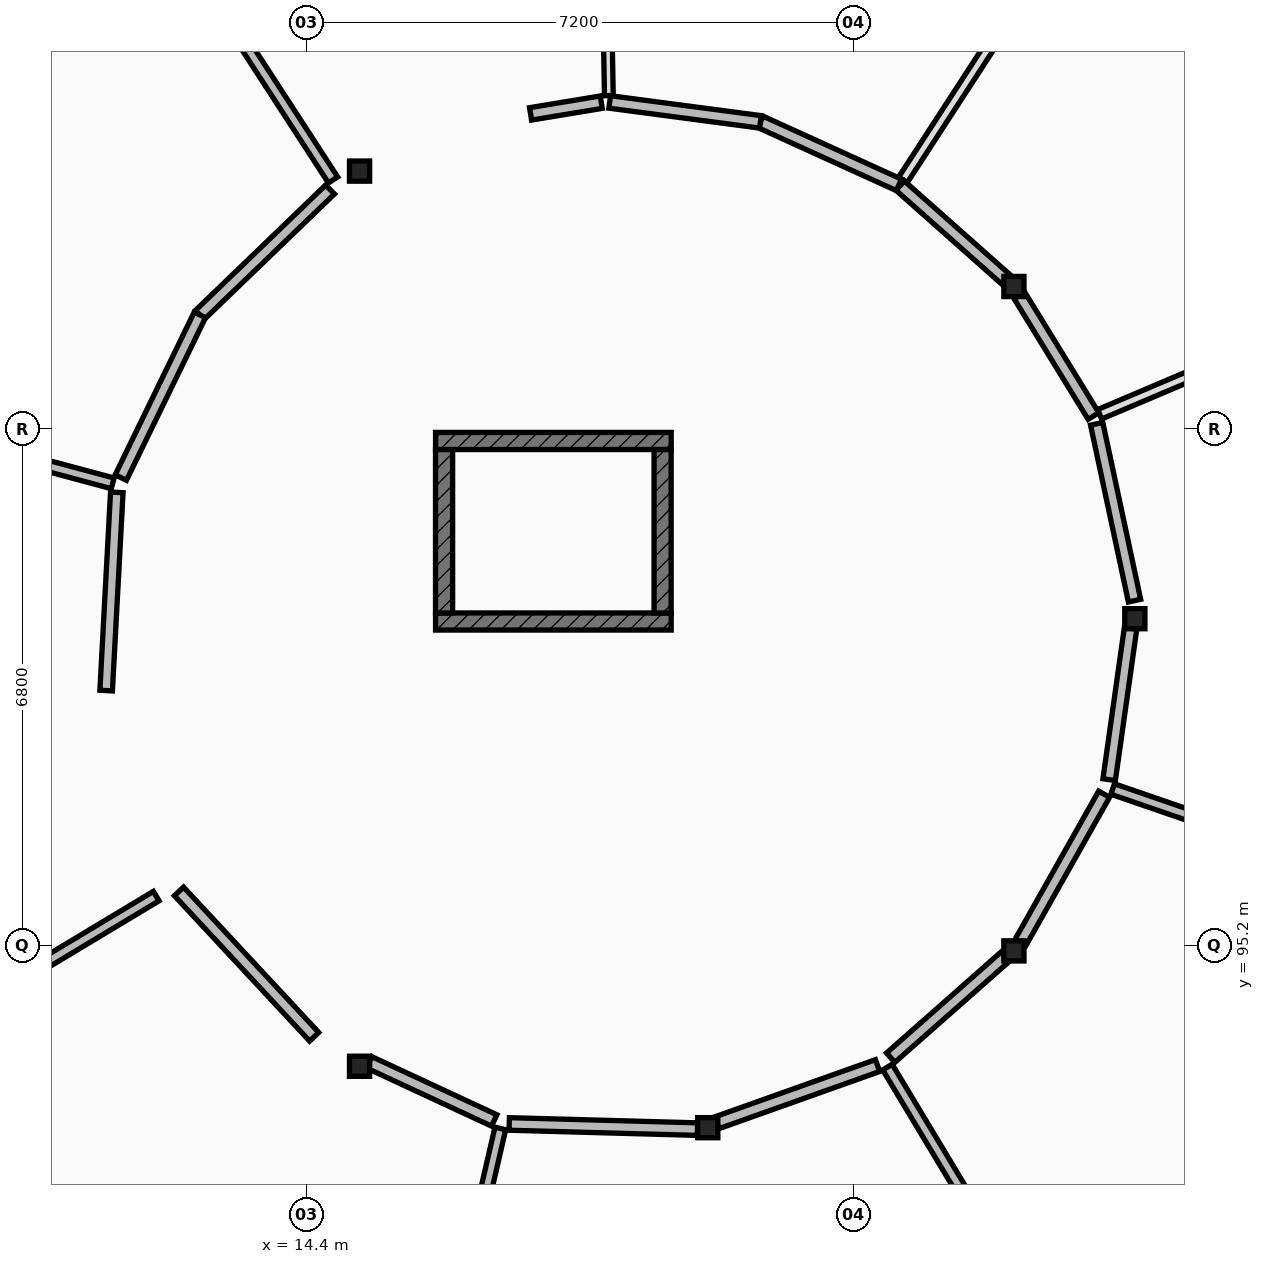
"""IFC4 building model, lengths in metres.
Left out: names, types, materials, properties, quantities, classifications, styles, units other than length and angle.
Written with IfcOpenShell. Run it as: python <this file> out.ifc"""

import sys

from ifc_helpers import new_model, si_unit, direction, frame, frame_2d, origin, origin_2d, place, context, subcontext, project, spatial, rectangle, extrude, element, fill, save


model = new_model("IFC4")
c1 = context("Model", 3, precision=1e-05, world=origin(), true_north=direction((0.0, 1.0)))
c2 = subcontext(c1, "Body", "Model", "MODEL_VIEW")
j1 = project(units=[si_unit("LENGTHUNIT", "METRE"), si_unit("PLANEANGLEUNIT", "RADIAN")], contexts=[c1])
p1 = place(None, origin())
s1 = spatial("IfcSite", under=j1, at=p1, CompositionType="ELEMENT")
p2 = place(p1, origin())
s2 = spatial("IfcBuilding", under=s1, at=p2, CompositionType="ELEMENT")
p3 = place(p2, frame((0.0, 0.0, 17.15)))
s3 = spatial("IfcBuildingStorey", under=s2, at=p3, CompositionType="ELEMENT", Elevation=17.15)
for number, where, z_axis, x_axis in (
    (1, (25.3, 99.5, 0.0), (0.0, 0.0, 1.0), (1.0, 0.0, 0.0)),
    (2, (23.709, 103.871, 0.0), (0.0, 0.0, 1.0), (1.0, 0.0, 0.0)),
    (3, (15.1, 105.389, 0.0), (0.0, 0.0, 1.0), (1.0, 0.0, 0.0)),
    (4, (15.1, 93.611, 0.0), (0.0, 0.0, 1.0), (1.0, 0.0, 0.0)),
    (5, (19.681, 92.803, 0.0), (0.0, 0.0, 1.0), (1.0, 0.0, 0.0)),
    (6, (23.709, 95.129, 0.0), (0.0, 0.0, 1.0), (1.0, 0.0, 0.0)),
):
    element("IfcColumn", number, at=place(p3, frame(where, z_axis=z_axis, x_axis=x_axis)), inside=s3, PredefinedType="COLUMN", context=c2, shape_type="SweptSolid", body=[
        extrude(rectangle(XDim=0.265, YDim=0.265, at=origin_2d()), origin(), (0.0, 0.0, 1.0), 4.2),
    ])
p4 = place(p3, frame((16.1, 99.463, 0.0), z_axis=(0.0, 0.0, 1.0), x_axis=(1.0, 0.0, 0.0)))
e7 = element("IfcWall", 7, at=p4, inside=s3, PredefinedType="SHEAR", context=c2, shape_type="SweptSolid", body=[
    extrude(rectangle(XDim=3.1, YDim=0.225, at=frame_2d((1.55, 0.0))), origin(), (0.0, 0.0, 1.0), 4.015),
])
p5 = place(p4, frame((0.95, 0.0, 0.0)))
e8 = element("IfcOpeningElement", 8, at=p5, cuts=e7, PredefinedType="OPENING", context=c2, shape_type="SweptSolid", body=[
    extrude(rectangle(XDim=1.2, YDim=2.2, at=frame_2d((0.6, 1.1))), frame((0.0, 0.123, 0.0), z_axis=(0.0, -1.0, 0.0), x_axis=(1.0, 0.0, 0.0)), (0.0, 0.0, 1.0), 0.245),
])
p6 = place(p3, frame((16.1, 101.838, 0.0), z_axis=(0.0, 0.0, 1.0), x_axis=(1.0, 0.0, 0.0)))
e9 = element("IfcWall", 9, at=p6, inside=s3, PredefinedType="SHEAR", context=c2, shape_type="SweptSolid", body=[
    extrude(rectangle(XDim=3.1, YDim=0.225, at=frame_2d((1.55, 0.0))), origin(), (0.0, 0.0, 1.0), 4.015),
])
for number, where, z_axis, x_axis in (
    (10, (16.212, 99.575, 0.0), (0.0, 0.0, 1.0), (0.0, 1.0, 0.0)),
    (11, (19.087, 99.575, 0.0), (0.0, 0.0, 1.0), (0.0, 1.0, 0.0)),
):
    element("IfcWall", number, at=place(p3, frame(where, z_axis=z_axis, x_axis=x_axis)), inside=s3, PredefinedType="SHEAR", context=c2, shape_type="SweptSolid", body=[
        extrude(rectangle(XDim=2.15, YDim=0.225, at=frame_2d((1.075, 0.0))), origin(), (0.0, 0.0, 1.0), 4.015),
    ])
p7 = place(p3, frame((14.751, 105.273, 0.0), z_axis=(0.0, 0.0, 1.0), x_axis=(-0.544677189284, 0.838645789039, 0.0)))
e12 = element("IfcWall", 12, at=p7, inside=s3, PredefinedType="PARTITIONING", context=c2, shape_type="SweptSolid", body=[
    extrude(rectangle(XDim=5.875, YDim=0.145, at=frame_2d((2.938, 0.0))), origin(), (0.0, 0.0, 1.0), 3.344),
])
p8 = place(p3, frame((11.852, 101.281, 0.0), z_axis=(0.0, 0.0, 1.0), x_axis=(-0.965846685591, 0.259114221787, 0.0)))
e13 = element("IfcWall", 13, at=p8, inside=s3, PredefinedType="PARTITIONING", context=c2, shape_type="SweptSolid", body=[
    extrude(rectangle(XDim=1.162, YDim=0.145, at=frame_2d((0.581, 0.0))), origin(), (0.0, 0.0, 1.0), 3.344),
])
p9 = place(p3, frame((12.425, 95.85, 0.0), z_axis=(0.0, 0.0, 1.0), x_axis=(-0.857148493381, -0.515069374255, 0.0)))
e14 = element("IfcWall", 14, at=p9, inside=s3, PredefinedType="PARTITIONING", context=c2, shape_type="SweptSolid", body=[
    extrude(rectangle(XDim=5.695, YDim=0.145, at=frame_2d((2.847, 0.0))), origin(), (0.0, 0.0, 1.0), 3.344),
])
p10 = place(p3, frame((16.952, 92.793, 0.0), z_axis=(0.0, 0.0, 1.0), x_axis=(-0.225041614944, -0.97434915279, 0.0)))
e15 = element("IfcWall", 15, at=p10, inside=s3, PredefinedType="PARTITIONING", context=c2, shape_type="SweptSolid", body=[
    extrude(rectangle(XDim=5.875, YDim=0.145, at=frame_2d((2.937, 0.0))), origin(), (0.0, 0.0, 1.0), 3.344),
])
p11 = place(p3, frame((22.045, 93.6, 0.0), z_axis=(0.0, 0.0, 1.0), x_axis=(0.515043444679, -0.857164074197, 0.0)))
e16 = element("IfcWall", 16, at=p11, inside=s3, PredefinedType="PARTITIONING", context=c2, shape_type="SweptSolid", body=[
    extrude(rectangle(XDim=5.899, YDim=0.145, at=frame_2d((2.949, 0.0))), origin(), (0.0, 0.0, 1.0), 3.344),
])
p12 = place(p3, frame((25.008, 97.259, 0.0), z_axis=(0.0, 0.0, 1.0), x_axis=(0.945537377012, -0.325513546068, 0.0)))
e17 = element("IfcWall", 17, at=p12, inside=s3, PredefinedType="PARTITIONING", context=c2, shape_type="SweptSolid", body=[
    extrude(rectangle(XDim=5.898, YDim=0.145, at=frame_2d((2.949, 0.0))), origin(), (0.0, 0.0, 1.0), 3.344),
])
p13 = place(p3, frame((24.836, 102.189, 0.0), z_axis=(0.0, 0.0, 1.0), x_axis=(0.920468107404, 0.390817685438, 0.0)))
e18 = element("IfcWall", 18, at=p13, inside=s3, PredefinedType="PLUMBINGWALL", context=c2, shape_type="SweptSolid", body=[
    extrude(rectangle(XDim=5.875, YDim=0.135, at=frame_2d((2.938, 0.0))), origin(), (0.0, 0.0, 1.0), 3.344),
])
p14 = place(p3, frame((22.249, 105.273, 0.0), z_axis=(0.0, 0.0, 1.0), x_axis=(0.544677189284, 0.838645789039, 0.0)))
e19 = element("IfcWall", 19, at=p14, inside=s3, PredefinedType="PLUMBINGWALL", context=c2, shape_type="SweptSolid", body=[
    extrude(rectangle(XDim=5.875, YDim=0.135, at=frame_2d((2.938, 0.0))), origin(), (0.0, 0.0, 1.0), 3.344),
])
p15 = place(p3, frame((18.38, 106.382, 0.0), z_axis=(0.0, 0.0, 1.0), x_axis=(-0.017869018934, 0.999840336335, 0.0)))
e20 = element("IfcWall", 20, at=p15, inside=s3, PredefinedType="PARTITIONING", context=c2, shape_type="SweptSolid", body=[
    extrude(rectangle(XDim=0.888, YDim=0.115, at=frame_2d((0.444, 0.0))), origin(), (0.0, 0.0, 1.0), 3.344),
])
p16 = place(p3, frame((14.712, 105.147, 0.0), z_axis=(0.0, 0.0, 1.0), x_axis=(-0.720225223762, -0.693740316731, 0.0)))
e21 = element("IfcWall", 21, at=p16, inside=s3, PredefinedType="PARTITIONING", context=c2, shape_type="SweptSolid", body=[
    extrude(rectangle(XDim=2.378, YDim=0.165, at=frame_2d((1.189, 0.0))), origin(), (0.0, 0.0, 1.0), 3.344),
])
p17 = place(p16, frame((0.69, 0.0, 0.0)))
e22 = element("IfcOpeningElement", 22, at=p17, cuts=e21, PredefinedType="OPENING", context=c2, shape_type="SweptSolid", body=[
    extrude(rectangle(XDim=1.0, YDim=2.14, at=frame_2d((0.5, 1.07))), frame((0.0, 0.093, 0.0), z_axis=(0.0, -1.0, 0.0), x_axis=(1.0, 0.0, 0.0)), (0.0, 0.0, 1.0), 0.185),
])
p18 = place(p3, frame((12.999, 103.497, 0.0), z_axis=(0.0, 0.0, 1.0), x_axis=(-0.437088964267, -0.899418277175, 0.0)))
e23 = element("IfcWall", 23, at=p18, inside=s3, PredefinedType="PARTITIONING", context=c2, shape_type="SweptSolid", body=[
    extrude(rectangle(XDim=2.379, YDim=0.165, at=frame_2d((1.19, 0.0))), origin(), (0.0, 0.0, 1.0), 3.344),
])
p19 = place(p3, frame((11.906, 101.162, 0.0), z_axis=(0.0, 0.0, 1.0), x_axis=(-0.053559631757, -0.998564652812, 0.0)))
e24 = element("IfcWall", 24, at=p19, inside=s3, PredefinedType="PARTITIONING", context=c2, shape_type="SweptSolid", body=[
    extrude(rectangle(XDim=2.612, YDim=0.165, at=frame_2d((1.306, 0.0))), origin(), (0.0, 0.0, 1.0), 3.344),
])
p20 = place(p19, frame((0.786, 0.0, 0.0)))
e25 = element("IfcOpeningElement", 25, at=p20, cuts=e24, PredefinedType="OPENING", context=c2, shape_type="SweptSolid", body=[
    extrude(rectangle(XDim=1.04, YDim=2.14, at=frame_2d((0.52, 1.07))), frame((0.0, 0.093, 0.0), z_axis=(0.0, -1.0, 0.0), x_axis=(1.0, 0.0, 0.0)), (0.0, 0.0, 1.0), 0.185),
])
p21 = place(p3, frame((12.724, 95.912, 0.0), z_axis=(0.0, 0.0, 1.0), x_axis=(0.680938469168, -0.732340631952, 0.0)))
e26 = element("IfcWall", 26, at=p21, inside=s3, PredefinedType="PARTITIONING", context=c2, shape_type="SweptSolid", body=[
    extrude(rectangle(XDim=2.612, YDim=0.165, at=frame_2d((1.306, 0.0))), origin(), (0.0, 0.0, 1.0), 3.344),
])
p22 = place(p21, frame((0.766, 0.0, 0.0)))
e27 = element("IfcOpeningElement", 27, at=p22, cuts=e26, PredefinedType="OPENING", context=c2, shape_type="SweptSolid", body=[
    extrude(rectangle(XDim=1.08, YDim=2.16, at=frame_2d((0.54, 1.08))), frame((0.0, 0.093, 0.0), z_axis=(0.0, -1.0, 0.0), x_axis=(1.0, 0.0, 0.0)), (0.0, 0.0, 1.0), 0.185),
])
p23 = place(p3, frame((15.228, 93.662, 0.0), z_axis=(0.0, 0.0, 1.0), x_axis=(0.906828861557, -0.421499010495, 0.0)))
e28 = element("IfcWall", 28, at=p23, inside=s3, PredefinedType="PARTITIONING", context=c2, shape_type="SweptSolid", body=[
    extrude(rectangle(XDim=1.813, YDim=0.165, at=frame_2d((0.906, 0.0))), origin(), (0.0, 0.0, 1.0), 3.344),
])
p24 = place(p3, frame((17.069, 92.852, 0.0), z_axis=(0.0, 0.0, 1.0), x_axis=(0.999621757445, -0.027501673437, 0.0)))
e29 = element("IfcWall", 29, at=p24, inside=s3, PredefinedType="PARTITIONING", context=c2, shape_type="SweptSolid", body=[
    extrude(rectangle(XDim=2.477, YDim=0.165, at=frame_2d((1.238, 0.0))), origin(), (0.0, 0.0, 1.0), 3.344),
])
p25 = place(p24, frame((0.679, 0.0, 0.0)))
e30 = element("IfcOpeningElement", 30, at=p25, cuts=e29, PredefinedType="OPENING", context=c2, shape_type="SweptSolid", body=[
    extrude(rectangle(XDim=1.12, YDim=2.16, at=frame_2d((0.56, 1.08))), frame((0.0, 0.093, 0.0), z_axis=(0.0, -1.0, 0.0), x_axis=(1.0, 0.0, 0.0)), (0.0, 0.0, 1.0), 0.185),
])
p26 = place(p3, frame((19.802, 92.868, 0.0), z_axis=(0.0, 0.0, 1.0), x_axis=(0.942088643155, 0.335363964132, 0.0)))
e31 = element("IfcWall", 31, at=p26, inside=s3, PredefinedType="PARTITIONING", context=c2, shape_type="SweptSolid", body=[
    extrude(rectangle(XDim=2.243, YDim=0.165, at=frame_2d((1.122, 0.0))), origin(), (0.0, 0.0, 1.0), 3.344),
])
p27 = place(p3, frame((22.088, 93.724, 0.0), z_axis=(0.0, 0.0, 1.0), x_axis=(0.750064751016, 0.66136439977, 0.0)))
e32 = element("IfcWall", 32, at=p27, inside=s3, PredefinedType="PARTITIONING", context=c2, shape_type="SweptSolid", body=[
    extrude(rectangle(XDim=2.009, YDim=0.165, at=frame_2d((1.005, 0.0))), origin(), (0.0, 0.0, 1.0), 3.344),
])
p28 = place(p27, frame((0.424, 0.0, 0.0)))
e33 = element("IfcOpeningElement", 33, at=p28, cuts=e32, PredefinedType="OPENING", context=c2, shape_type="SweptSolid", body=[
    extrude(rectangle(XDim=1.16, YDim=2.18, at=frame_2d((0.58, 1.09))), frame((0.0, 0.093, 0.0), z_axis=(0.0, -1.0, 0.0), x_axis=(1.0, 0.0, 0.0)), (0.0, 0.0, 1.0), 0.185),
])
p29 = place(p3, frame((23.794, 95.237, 0.0), z_axis=(0.0, 0.0, 1.0), x_axis=(0.491278846753, 0.87100235059, 0.0)))
e34 = element("IfcWall", 34, at=p29, inside=s3, PredefinedType="PARTITIONING", context=c2, shape_type="SweptSolid", body=[
    extrude(rectangle(XDim=2.243, YDim=0.165, at=frame_2d((1.122, 0.0))), origin(), (0.0, 0.0, 1.0), 3.344),
])
p30 = place(p3, frame((24.962, 97.382, 0.0), z_axis=(0.0, 0.0, 1.0), x_axis=(0.140164013462, 0.990128299429, 0.0)))
e35 = element("IfcWall", 35, at=p30, inside=s3, PredefinedType="PARTITIONING", context=c2, shape_type="SweptSolid", body=[
    extrude(rectangle(XDim=2.012, YDim=0.165, at=frame_2d((1.006, 0.0))), origin(), (0.0, 0.0, 1.0), 3.344),
])
p31 = place(p30, frame((0.396, 0.0, 0.0)))
e36 = element("IfcOpeningElement", 36, at=p31, cuts=e35, PredefinedType="OPENING", context=c2, shape_type="SweptSolid", body=[
    extrude(rectangle(XDim=1.22, YDim=2.18, at=frame_2d((0.61, 1.09))), frame((0.0, 0.093, 0.0), z_axis=(0.0, -1.0, 0.0), x_axis=(1.0, 0.0, 0.0)), (0.0, 0.0, 1.0), 0.185),
])
p32 = place(p3, frame((25.296, 99.737, 0.0), z_axis=(0.0, 0.0, 1.0), x_axis=(-0.209199758456, 0.977872926848, 0.0)))
e37 = element("IfcWall", 37, at=p32, inside=s3, PredefinedType="PARTITIONING", context=c2, shape_type="SweptSolid", body=[
    extrude(rectangle(XDim=2.38, YDim=0.165, at=frame_2d((1.19, 0.0))), origin(), (0.0, 0.0, 1.0), 3.344),
])
p33 = place(p3, frame((24.756, 102.166, 0.0), z_axis=(0.0, 0.0, 1.0), x_axis=(-0.523293079125, 0.852152775821, 0.0)))
e38 = element("IfcWall", 38, at=p33, inside=s3, PredefinedType="PARTITIONING", context=c2, shape_type="SweptSolid", body=[
    extrude(rectangle(XDim=1.863, YDim=0.165, at=frame_2d((0.932, 0.0))), origin(), (0.0, 0.0, 1.0), 3.344),
])
p34 = place(p33, frame((0.482, 0.0, 0.0)))
e39 = element("IfcOpeningElement", 39, at=p34, cuts=e38, PredefinedType="OPENING", context=c2, shape_type="SweptSolid", body=[
    extrude(rectangle(XDim=0.9, YDim=2.1, at=frame_2d((0.45, 1.05))), frame((0.0, 0.093, 0.0), z_axis=(0.0, -1.0, 0.0), x_axis=(1.0, 0.0, 0.0)), (0.0, 0.0, 1.0), 0.185),
])
p35 = place(p3, frame((23.606, 103.962, 0.0), z_axis=(0.0, 0.0, 1.0), x_axis=(-0.748225706364, 0.66344426468, 0.0)))
e40 = element("IfcWall", 40, at=p35, inside=s3, PredefinedType="PARTITIONING", context=c2, shape_type="SweptSolid", body=[
    extrude(rectangle(XDim=1.863, YDim=0.165, at=frame_2d((0.932, 0.0))), origin(), (0.0, 0.0, 1.0), 3.344),
])
p36 = place(p3, frame((22.196, 105.208, 0.0), z_axis=(0.0, 0.0, 1.0), x_axis=(-0.910195152859, 0.414179651495, 0.0)))
e41 = element("IfcWall", 41, at=p36, inside=s3, PredefinedType="PARTITIONING", context=c2, shape_type="SweptSolid", body=[
    extrude(rectangle(XDim=2.002, YDim=0.165, at=frame_2d((1.001, 0.0))), origin(), (0.0, 0.0, 1.0), 3.344),
])
p37 = place(p36, frame((0.53, 0.0, 0.0)))
e42 = element("IfcOpeningElement", 42, at=p37, cuts=e41, PredefinedType="OPENING", context=c2, shape_type="SweptSolid", body=[
    extrude(rectangle(XDim=0.94, YDim=2.1, at=frame_2d((0.47, 1.05))), frame((0.0, 0.093, 0.0), z_axis=(0.0, -1.0, 0.0), x_axis=(1.0, 0.0, 0.0)), (0.0, 0.0, 1.0), 0.185),
])
p38 = place(p3, frame((20.374, 106.037, 0.0), z_axis=(0.0, 0.0, 1.0), x_axis=(-0.991386025062, 0.13097232269, 0.0)))
e43 = element("IfcWall", 43, at=p38, inside=s3, PredefinedType="PARTITIONING", context=c2, shape_type="SweptSolid", body=[
    extrude(rectangle(XDim=2.0, YDim=0.165, at=frame_2d((1.0, 0.0))), origin(), (0.0, 0.0, 1.0), 3.344),
])
p39 = place(p3, frame((18.28, 106.296, 0.0), z_axis=(0.0, 0.0, 1.0), x_axis=(-0.986596185152, -0.163180781477, 0.0)))
e44 = element("IfcWall", 44, at=p39, inside=s3, PredefinedType="PARTITIONING", context=c2, shape_type="SweptSolid", body=[
    extrude(rectangle(XDim=0.943, YDim=0.165, at=frame_2d((0.471, 0.0))), origin(), (0.0, 0.0, 1.0), 3.344),
])
p40 = place(p5, origin())
e45 = element("IfcDoor", 45, at=p40, inside=s3, OperationType="DOUBLE_DOOR_SLIDING", PredefinedType="DOOR", context=c2, shape_type="SweptSolid", body=[
    extrude(rectangle(XDim=1.2, YDim=2.2, at=frame_2d((0.6, 1.1))), frame((0.0, 0.025, 0.0), z_axis=(0.0, -1.0, 0.0), x_axis=(1.0, 0.0, 0.0)), (0.0, 0.0, 1.0), 0.05),
])
fill(e8, e45)
p41 = place(p17, origin())
e46 = element("IfcDoor", 46, at=p41, inside=s3, OperationType="SINGLE_SWING_LEFT", PredefinedType="DOOR", context=c2, shape_type="SweptSolid", body=[
    extrude(rectangle(XDim=1.0, YDim=2.14, at=frame_2d((0.5, 1.07))), frame((0.0, 0.025, 0.0), z_axis=(0.0, -1.0, 0.0), x_axis=(1.0, 0.0, 0.0)), (0.0, 0.0, 1.0), 0.05),
])
fill(e22, e46)
p42 = place(p20, origin())
e47 = element("IfcDoor", 47, at=p42, inside=s3, OperationType="SINGLE_SWING_RIGHT", PredefinedType="DOOR", context=c2, shape_type="SweptSolid", body=[
    extrude(rectangle(XDim=1.04, YDim=2.14, at=frame_2d((0.52, 1.07))), frame((0.0, 0.025, 0.0), z_axis=(0.0, -1.0, 0.0), x_axis=(1.0, 0.0, 0.0)), (0.0, 0.0, 1.0), 0.05),
])
fill(e25, e47)
p43 = place(p22, origin())
e48 = element("IfcDoor", 48, at=p43, inside=s3, OperationType="SINGLE_SWING_LEFT", PredefinedType="DOOR", context=c2, shape_type="SweptSolid", body=[
    extrude(rectangle(XDim=1.08, YDim=2.16, at=frame_2d((0.54, 1.08))), frame((0.0, 0.025, 0.0), z_axis=(0.0, -1.0, 0.0), x_axis=(1.0, 0.0, 0.0)), (0.0, 0.0, 1.0), 0.05),
])
fill(e27, e48)
p44 = place(p25, origin())
e49 = element("IfcDoor", 49, at=p44, inside=s3, OperationType="SINGLE_SWING_RIGHT", PredefinedType="DOOR", context=c2, shape_type="SweptSolid", body=[
    extrude(rectangle(XDim=1.12, YDim=2.16, at=frame_2d((0.56, 1.08))), frame((0.0, 0.025, 0.0), z_axis=(0.0, -1.0, 0.0), x_axis=(1.0, 0.0, 0.0)), (0.0, 0.0, 1.0), 0.05),
])
fill(e30, e49)
p45 = place(p28, origin())
e50 = element("IfcDoor", 50, at=p45, inside=s3, OperationType="SINGLE_SWING_LEFT", PredefinedType="DOOR", context=c2, shape_type="SweptSolid", body=[
    extrude(rectangle(XDim=1.16, YDim=2.18, at=frame_2d((0.58, 1.09))), frame((0.0, 0.025, 0.0), z_axis=(0.0, -1.0, 0.0), x_axis=(1.0, 0.0, 0.0)), (0.0, 0.0, 1.0), 0.05),
])
fill(e33, e50)
p46 = place(p31, origin())
e51 = element("IfcDoor", 51, at=p46, inside=s3, OperationType="SINGLE_SWING_RIGHT", PredefinedType="DOOR", context=c2, shape_type="SweptSolid", body=[
    extrude(rectangle(XDim=1.22, YDim=2.18, at=frame_2d((0.61, 1.09))), frame((0.0, 0.025, 0.0), z_axis=(0.0, -1.0, 0.0), x_axis=(1.0, 0.0, 0.0)), (0.0, 0.0, 1.0), 0.05),
])
fill(e36, e51)
p47 = place(p34, origin())
e52 = element("IfcDoor", 52, at=p47, inside=s3, OperationType="SINGLE_SWING_LEFT", PredefinedType="DOOR", context=c2, shape_type="SweptSolid", body=[
    extrude(rectangle(XDim=0.9, YDim=2.1, at=frame_2d((0.45, 1.05))), frame((0.0, 0.025, 0.0), z_axis=(0.0, -1.0, 0.0), x_axis=(1.0, 0.0, 0.0)), (0.0, 0.0, 1.0), 0.05),
])
fill(e39, e52)
p48 = place(p37, origin())
e53 = element("IfcDoor", 53, at=p48, inside=s3, OperationType="SINGLE_SWING_RIGHT", PredefinedType="DOOR", context=c2, shape_type="SweptSolid", body=[
    extrude(rectangle(XDim=0.94, YDim=2.1, at=frame_2d((0.47, 1.05))), frame((0.0, 0.025, 0.0), z_axis=(0.0, -1.0, 0.0), x_axis=(1.0, 0.0, 0.0)), (0.0, 0.0, 1.0), 0.05),
])
fill(e42, e53)
save(model, sys.argv[1])
